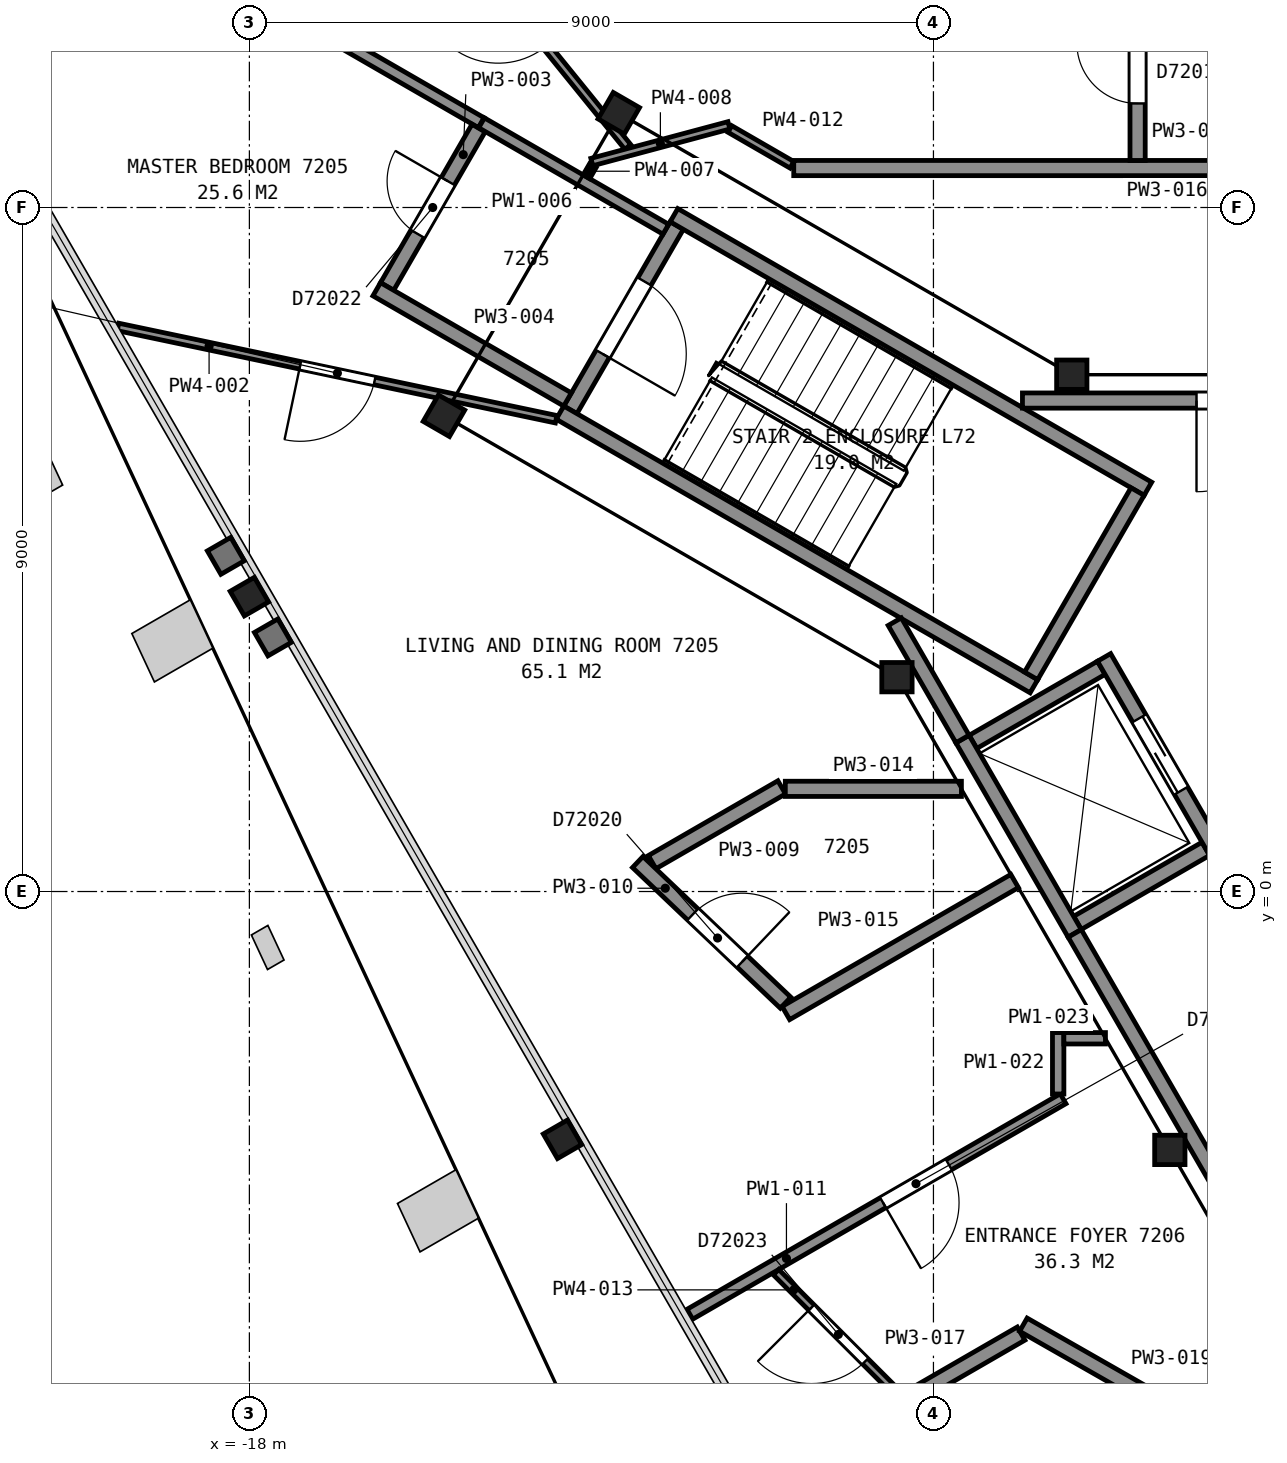
"""IFC4 building model, lengths in metres.
Left out: names, types, materials, properties, quantities, classifications, styles, units other than length and angle.
Written with IfcOpenShell. Run it as: python <this file> out.ifc"""

import sys

from ifc_helpers import new_model, si_unit, direction, frame, frame_2d, origin, origin_2d, place, context, subcontext, project, spatial, rectangle, i_section, extrude, element, fill, save


model = new_model("IFC4")
c1 = context("Model", 3, precision=1e-05, world=origin(), true_north=direction((0.0, 1.0)))
c2 = subcontext(c1, "Body", "Model", "MODEL_VIEW")
j1 = project(units=[si_unit("LENGTHUNIT", "METRE"), si_unit("PLANEANGLEUNIT", "RADIAN")], contexts=[c1])
p1 = place(None, origin())
s1 = spatial("IfcSite", under=j1, at=p1, CompositionType="ELEMENT")
p2 = place(p1, origin())
s2 = spatial("IfcBuilding", under=s1, at=p2, CompositionType="ELEMENT")
p3 = place(p2, frame((0.0, 0.0, 286.2)))
s3 = spatial("IfcBuildingStorey", under=s2, at=p3, CompositionType="ELEMENT", Elevation=286.2)
for number, where, z_axis, x_axis in (
    (1, (-18.0, 3.88, 0.0), (0.0, 0.0, 1.0), (-0.5, 0.866, 0.0)),
    (2, (-13.88, -3.26, 0.0), (0.0, 0.0, 1.0), (-0.5, 0.866, 0.0)),
):
    element("IfcColumn", number, at=place(p3, frame(where, z_axis=z_axis, x_axis=x_axis)), inside=s3, PredefinedType="COLUMN", context=c2, shape_type="SweptSolid", body=[
        extrude(i_section(OverallWidth=0.373, OverallDepth=0.368, WebThickness=0.015, FlangeThickness=0.024, FilletRadius=0.015, at=origin_2d()), origin(), (0.0, 0.0, 1.0), 3.7),
    ])
p4 = place(p3, frame((-7.18, 6.8, 0.0), z_axis=(0.0, 0.0, 1.0), x_axis=(1.0, 0.0, 0.0)))
e3 = element("IfcColumn", 3, at=p4, inside=s3, PredefinedType="COLUMN", context=c2, shape_type="SweptSolid", body=[
    extrude(i_section(OverallWidth=0.399, OverallDepth=0.386, WebThickness=0.021, FlangeThickness=0.033, FilletRadius=0.015, at=origin_2d()), origin(), (0.0, 0.0, 1.0), 3.7),
])
for number, where, z_axis, x_axis in (
    (4, (-13.14, 10.24, 0.0), (0.0, 0.0, 1.0), (0.5, 0.866, 0.0)),
    (5, (-15.44, 6.26, 0.0), (0.0, 0.0, 1.0), (0.5, 0.866, 0.0)),
):
    element("IfcColumn", number, at=place(p3, frame(where, z_axis=z_axis, x_axis=x_axis)), inside=s3, PredefinedType="COLUMN", context=c2, shape_type="SweptSolid", body=[
        extrude(i_section(OverallWidth=0.401, OverallDepth=0.399, WebThickness=0.025, FlangeThickness=0.04, FilletRadius=0.015, at=origin_2d()), origin(), (0.0, 0.0, 1.0), 3.7),
    ])
for number, where, z_axis, x_axis in (
    (6, (-9.48, 2.82, 0.0), (0.0, 0.0, 1.0), (1.0, 0.0, 0.0)),
    (7, (-5.89, -3.4, 0.0), (0.0, 0.0, 1.0), (1.0, 0.0, 0.0)),
):
    element("IfcColumn", number, at=place(p3, frame(where, z_axis=z_axis, x_axis=x_axis)), inside=s3, PredefinedType="COLUMN", context=c2, shape_type="SweptSolid", body=[
        extrude(i_section(OverallWidth=0.399, OverallDepth=0.386, WebThickness=0.021, FlangeThickness=0.033, FilletRadius=0.015, at=origin_2d()), origin(), (0.0, 0.0, 1.0), 3.7),
    ])
p5 = place(p3, frame((-12.377, 8.762, 0.0), z_axis=(0.0, 0.0, 1.0), x_axis=(-0.500049511043, -0.865996816683, 0.0)))
e8 = element("IfcWall", 8, at=p5, inside=s3, PredefinedType="PARTITIONING", context=c2, shape_type="SweptSolid", body=[
    extrude(rectangle(XDim=2.8, YDim=0.2, at=frame_2d((1.4, 0.0))), origin(), (0.0, 0.0, 1.0), 3.45),
])
p6 = place(p5, frame((0.85, 0.0, 0.0)))
e9 = element("IfcOpeningElement", 9, at=p6, cuts=e8, PredefinedType="OPENING", context=c2, shape_type="SweptSolid", body=[
    extrude(rectangle(XDim=1.1, YDim=2.1, at=frame_2d((0.55, 1.05))), frame((0.0, 0.11, 0.0), z_axis=(0.0, -1.0, 0.0), x_axis=(1.0, 0.0, 0.0)), (0.0, 0.0, 1.0), 0.22),
])
for number, where, z_axis, x_axis in (
    (10, (-7.678, 2.701, 0.0), (0.0, 0.0, 1.0), (-0.866, 0.5, 0.0)),
    (11, (-6.178, 5.299, 0.0), (0.0, 0.0, 1.0), (-0.866, 0.5, 0.0)),
):
    element("IfcWall", number, at=place(p3, frame(where, z_axis=z_axis, x_axis=x_axis)), inside=s3, PredefinedType="PARTITIONING", context=c2, shape_type="SweptSolid", body=[
        extrude(rectangle(XDim=7.2, YDim=0.2, at=frame_2d((3.6, 0.0))), origin(), (0.0, 0.0, 1.0), 3.45),
    ])
p7 = place(p3, frame((-6.315, 5.262, 0.0), z_axis=(0.0, 0.0, 1.0), x_axis=(-0.500049511043, -0.865996816683, 0.0)))
e12 = element("IfcWall", 12, at=p7, inside=s3, PredefinedType="PARTITIONING", context=c2, shape_type="SweptSolid", body=[
    extrude(rectangle(XDim=2.8, YDim=0.2, at=frame_2d((1.4, 0.0))), origin(), (0.0, 0.0, 1.0), 3.45),
])
for number, where, z_axis, x_axis in (
    (13, (-7.105, -0.413, 0.0), (0.0, 0.0, 1.0), (0.866, 0.5, 0.0)),
    (14, (-8.48, 1.969, 0.0), (0.0, 0.0, 1.0), (0.866, 0.5, 0.0)),
):
    element("IfcWall", number, at=place(p3, frame(where, z_axis=z_axis, x_axis=x_axis)), inside=s3, PredefinedType="PARTITIONING", context=c2, shape_type="SweptSolid", body=[
        extrude(rectangle(XDim=1.95, YDim=0.2, at=frame_2d((0.975, 0.0))), origin(), (0.0, 0.0, 1.0), 3.7),
    ])
p8 = place(p3, frame((-5.28, 0.525, 0.0), z_axis=(0.0, 0.0, 1.0), x_axis=(-0.500037662692, 0.866003658127, 0.0)))
e15 = element("IfcWall", 15, at=p8, inside=s3, PredefinedType="PARTITIONING", context=c2, shape_type="SweptSolid", body=[
    extrude(rectangle(XDim=2.95, YDim=0.2, at=frame_2d((1.475, 0.0))), origin(), (0.0, 0.0, 1.0), 3.7),
])
p9 = place(p8, frame((0.925, 0.0, 0.0)))
e16 = element("IfcOpeningElement", 16, at=p9, cuts=e15, PredefinedType="OPENING", context=c2, shape_type="SweptSolid", body=[
    extrude(rectangle(XDim=1.1, YDim=2.1, at=frame_2d((0.55, 1.05))), frame((0.0, 0.11, 0.0), z_axis=(0.0, -1.0, 0.0), x_axis=(1.0, 0.0, 0.0)), (0.0, 0.0, 1.0), 0.22),
])
p10 = place(p3, frame((-7.142, -0.55, 0.0), z_axis=(0.0, 0.0, 1.0), x_axis=(-0.49997559174, 0.866039495442, 0.0)))
e17 = element("IfcWall", 17, at=p10, inside=s3, PredefinedType="PARTITIONING", context=c2, shape_type="SweptSolid", body=[
    extrude(rectangle(XDim=2.95, YDim=0.2, at=frame_2d((1.475, 0.0))), origin(), (0.0, 0.0, 1.0), 3.7),
])
p11 = place(p3, frame((-9.509, 3.551, 0.0), z_axis=(0.0, 0.0, 1.0), x_axis=(0.499999136801, -0.866025902152, 0.0)))
e18 = element("IfcWall", 18, at=p11, inside=s3, PredefinedType="PARTITIONING", context=c2, shape_type="SweptSolid", body=[
    extrude(rectangle(XDim=1.782, YDim=0.2, at=frame_2d((0.891, 0.0))), origin(), (0.0, 0.0, 1.0), 3.45),
])
p12 = place(p3, frame((7.829, 6.46, 0.0), z_axis=(0.0, 0.0, 1.0), x_axis=(-1.0, 0.0, 0.0)))
e19 = element("IfcWall", 19, at=p12, inside=s3, PredefinedType="PARTITIONING", context=c2, shape_type="SweptSolid", body=[
    extrude(rectangle(XDim=15.658, YDim=0.2, at=frame_2d((7.829, 0.0))), origin(), (0.0, 0.0, 1.0), 3.45),
])
p13 = place(p12, frame((12.168, 0.0, 0.0)))
e20 = element("IfcOpeningElement", 20, at=p13, cuts=e19, PredefinedType="OPENING", context=c2, shape_type="SweptSolid", body=[
    extrude(rectangle(XDim=1.2, YDim=2.1, at=frame_2d((0.6, 1.05))), frame((0.0, 0.11, 0.0), z_axis=(0.0, -1.0, 0.0), x_axis=(1.0, 0.0, 0.0)), (0.0, 0.0, 1.0), 0.22),
])
p14 = place(p3, frame((-7.141, -0.551, 0.0), z_axis=(0.0, 0.0, 1.0), x_axis=(0.500001302854, -0.86602465158, 0.0)))
e21 = element("IfcWall", 21, at=p14, inside=s3, PredefinedType="PARTITIONING", context=c2, shape_type="SweptSolid", body=[
    extrude(rectangle(XDim=6.846, YDim=0.2, at=frame_2d((3.423, 0.0))), origin(), (0.0, 0.0, 1.0), 3.45),
])
p15 = place(p14, frame((5.0, 0.0, 0.0)))
e22 = element("IfcOpeningElement", 22, at=p15, cuts=e21, PredefinedType="OPENING", context=c2, shape_type="SweptSolid", body=[
    extrude(rectangle(XDim=1.2, YDim=2.1, at=frame_2d((0.6, 1.05))), frame((0.0, 0.11, 0.0), z_axis=(0.0, -1.0, 0.0), x_axis=(1.0, 0.0, 0.0)), (0.0, 0.0, 1.0), 0.22),
])
p16 = place(p3, frame((-20.506, 13.324, 0.0), z_axis=(0.0, 0.0, 1.0), x_axis=(0.866004971522, -0.500035388047, 0.0)))
e23 = element("IfcWall", 23, at=p16, inside=s3, PredefinedType="PARTITIONING", context=c2, shape_type="SweptSolid", body=[
    extrude(rectangle(XDim=6.416, YDim=0.15, at=frame_2d((3.208, 0.0))), origin(), (0.0, 0.0, 1.0), 2.723),
])
p17 = place(p3, frame((-19.729, 7.428, 0.0), z_axis=(0.0, 0.0, 1.0), x_axis=(0.97852427483, -0.206131617102, 0.0)))
e24 = element("IfcWall", 24, at=p17, inside=s3, PredefinedType="PARTITIONING", context=c2, shape_type="SweptSolid", body=[
    extrude(rectangle(XDim=5.891, YDim=0.1, at=frame_2d((2.946, 0.0))), origin(), (0.0, 0.0, 1.0), 2.723),
])
p18 = place(p17, frame((2.45, 0.0, 0.0)))
e25 = element("IfcOpeningElement", 25, at=p18, cuts=e24, PredefinedType="OPENING", context=c2, shape_type="SweptSolid", body=[
    extrude(rectangle(XDim=1.0, YDim=2.1, at=frame_2d((0.5, 1.05))), frame((0.0, 0.06, 0.0), z_axis=(0.0, -1.0, 0.0), x_axis=(1.0, 0.0, 0.0)), (0.0, 0.0, 1.0), 0.12),
])
p19 = place(p3, frame((-14.985, 10.045, 0.0), z_axis=(0.0, 0.0, 1.0), x_axis=(-0.499903970786, -0.866080839178, 0.0)))
e26 = element("IfcWall", 26, at=p19, inside=s3, PredefinedType="PARTITIONING", context=c2, shape_type="SweptSolid", body=[
    extrude(rectangle(XDim=2.406, YDim=0.2, at=frame_2d((1.203, 0.0))), origin(), (0.0, 0.0, 1.0), 2.723),
])
p20 = place(p19, frame((0.806, 0.0, 0.0)))
e27 = element("IfcOpeningElement", 27, at=p20, cuts=e26, PredefinedType="OPENING", context=c2, shape_type="SweptSolid", body=[
    extrude(rectangle(XDim=0.8, YDim=2.1, at=frame_2d((0.4, 1.05))), frame((0.0, 0.11, 0.0), z_axis=(0.0, -1.0, 0.0), x_axis=(1.0, 0.0, 0.0)), (0.0, 0.0, 1.0), 0.22),
])
p21 = place(p3, frame((-16.325, 7.924, 0.0), z_axis=(0.0, 0.0, 1.0), x_axis=(0.865969617579, -0.500096612097, 0.0)))
e28 = element("IfcWall", 28, at=p21, inside=s3, PredefinedType="PARTITIONING", context=c2, shape_type="SweptSolid", body=[
    extrude(rectangle(XDim=2.899, YDim=0.2, at=frame_2d((1.45, 0.0))), origin(), (0.0, 0.0, 1.0), 2.723),
])
p22 = place(p3, frame((-13.021, 9.797, 0.0), z_axis=(0.0, 0.0, 1.0), x_axis=(-0.629738754572, 0.776806990822, 0.0)))
e29 = element("IfcWall", 29, at=p22, inside=s3, PredefinedType="PARTITIONING", context=c2, shape_type="SweptSolid", body=[
    extrude(rectangle(XDim=4.598, YDim=0.1, at=frame_2d((2.299, 0.0))), origin(), (0.0, 0.0, 1.0), 2.723),
])
p23 = place(p22, frame((1.706, 0.0, 0.0)))
e30 = element("IfcOpeningElement", 30, at=p23, cuts=e29, PredefinedType="OPENING", context=c2, shape_type="SweptSolid", body=[
    extrude(rectangle(XDim=1.0, YDim=2.1, at=frame_2d((0.5, 1.05))), frame((0.0, 0.06, 0.0), z_axis=(0.0, -1.0, 0.0), x_axis=(1.0, 0.0, 0.0)), (0.0, 0.0, 1.0), 0.12),
])
p24 = place(p3, frame((-14.945, 10.114, 0.0), z_axis=(0.0, 0.0, 1.0), x_axis=(0.865969158485, -0.500097407065, 0.0)))
e31 = element("IfcWall", 31, at=p24, inside=s3, PredefinedType="PARTITIONING", context=c2, shape_type="SweptSolid", body=[
    extrude(rectangle(XDim=2.799, YDim=0.15, at=frame_2d((1.4, 0.0))), origin(), (0.0, 0.0, 1.0), 2.723),
])
p25 = place(p3, frame((-13.565, 9.404, 0.0), z_axis=(0.0, 0.0, 1.0), x_axis=(0.500181256421, 0.865920730047, 0.0)))
e32 = element("IfcWall", 32, at=p25, inside=s3, PredefinedType="PARTITIONING", context=c2, shape_type="SweptSolid", body=[
    extrude(rectangle(XDim=0.169, YDim=0.1, at=frame_2d((0.084, 0.0))), origin(), (0.0, 0.0, 1.0), 2.723),
])
p26 = place(p3, frame((-13.494, 9.598, 0.0), z_axis=(0.0, 0.0, 1.0), x_axis=(0.96601104623, 0.258500790254, 0.0)))
e33 = element("IfcWall", 33, at=p26, inside=s3, PredefinedType="PARTITIONING", context=c2, shape_type="SweptSolid", body=[
    extrude(rectangle(XDim=1.867, YDim=0.1, at=frame_2d((0.934, 0.0))), origin(), (0.0, 0.0, 1.0), 2.723),
])
p27 = place(p3, frame((-12.701, 0.386, 0.0), z_axis=(0.0, 0.0, 1.0), x_axis=(0.866028603765, 0.49999445743, 0.0)))
e34 = element("IfcWall", 34, at=p27, inside=s3, PredefinedType="PARTITIONING", context=c2, shape_type="SweptSolid", body=[
    extrude(rectangle(XDim=1.968, YDim=0.2, at=frame_2d((0.984, 0.0))), origin(), (0.0, 0.0, 1.0), 2.723),
])
p28 = place(p3, frame((-12.89, 0.388, 0.0), z_axis=(0.0, 0.0, 1.0), x_axis=(0.724395225918, -0.689384911836, 0.0)))
e35 = element("IfcWall", 35, at=p28, inside=s3, PredefinedType="PARTITIONING", context=c2, shape_type="SweptSolid", body=[
    extrude(rectangle(XDim=2.685, YDim=0.2, at=frame_2d((1.342, 0.0))), origin(), (0.0, 0.0, 1.0), 2.723),
])
p29 = place(p28, frame((1.0, 0.0, 0.0)))
e36 = element("IfcOpeningElement", 36, at=p29, cuts=e35, PredefinedType="OPENING", context=c2, shape_type="SweptSolid", body=[
    extrude(rectangle(XDim=0.9, YDim=2.1, at=frame_2d((0.45, 1.05))), frame((0.0, 0.11, 0.0), z_axis=(0.0, -1.0, 0.0), x_axis=(1.0, 0.0, 0.0)), (0.0, 0.0, 1.0), 0.22),
])
p30 = place(p3, frame((-12.205, -5.562, 0.0), z_axis=(0.0, 0.0, 1.0), x_axis=(0.866006351856, 0.500032997455, 0.0)))
e37 = element("IfcWall", 37, at=p30, inside=s3, PredefinedType="PARTITIONING", context=c2, shape_type="SweptSolid", body=[
    extrude(rectangle(XDim=5.671, YDim=0.15, at=frame_2d((2.835, 0.0))), origin(), (0.0, 0.0, 1.0), 2.723),
])
p31 = place(p30, frame((2.935, 0.0, 0.0)))
e38 = element("IfcOpeningElement", 38, at=p31, cuts=e37, PredefinedType="OPENING", context=c2, shape_type="SweptSolid", body=[
    extrude(rectangle(XDim=1.0, YDim=2.1, at=frame_2d((0.5, 1.05))), frame((0.0, 0.085, 0.0), z_axis=(0.0, -1.0, 0.0), x_axis=(1.0, 0.0, 0.0)), (0.0, 0.0, 1.0), 0.17),
])
p32 = place(p3, frame((-11.678, 10.033, 0.0), z_axis=(0.0, 0.0, 1.0), x_axis=(0.866116627388, -0.499841962787, 0.0)))
e39 = element("IfcWall", 39, at=p32, inside=s3, PredefinedType="PARTITIONING", context=c2, shape_type="SweptSolid", body=[
    extrude(rectangle(XDim=0.943, YDim=0.1, at=frame_2d((0.472, 0.0))), origin(), (0.0, 0.0, 1.0), 2.723),
])
p33 = place(p3, frame((-9.452, -6.627, 0.0), z_axis=(0.0, 0.0, 1.0), x_axis=(-0.707106781187, 0.707106781187, 0.0)))
e40 = element("IfcWall", 40, at=p33, inside=s3, PredefinedType="PARTITIONING", context=c2, shape_type="SweptSolid", body=[
    extrude(rectangle(XDim=2.289, YDim=0.1, at=frame_2d((1.145, 0.0))), origin(), (0.0, 0.0, 1.0), 2.723),
])
p34 = place(p33, frame((0.63, 0.0, 0.0)))
e41 = element("IfcOpeningElement", 41, at=p34, cuts=e40, PredefinedType="OPENING", context=c2, shape_type="SweptSolid", body=[
    extrude(rectangle(XDim=1.0, YDim=2.1, at=frame_2d((0.5, 1.05))), frame((0.0, 0.06, 0.0), z_axis=(0.0, -1.0, 0.0), x_axis=(1.0, 0.0, 0.0)), (0.0, 0.0, 1.0), 0.12),
])
p35 = place(p3, frame((-10.949, 1.351, 0.0), z_axis=(0.0, 0.0, 1.0), x_axis=(1.0, 0.0, 0.0)))
e42 = element("IfcWall", 42, at=p35, inside=s3, PredefinedType="PARTITIONING", context=c2, shape_type="SweptSolid", body=[
    extrude(rectangle(XDim=2.317, YDim=0.2, at=frame_2d((1.158, 0.0))), origin(), (0.0, 0.0, 1.0), 2.723),
])
p36 = place(p3, frame((-10.942, -1.599, 0.0), z_axis=(0.0, 0.0, 1.0), x_axis=(0.866134116492, 0.499811656775, 0.0)))
e43 = element("IfcWall", 43, at=p36, inside=s3, PredefinedType="PARTITIONING", context=c2, shape_type="SweptSolid", body=[
    extrude(rectangle(XDim=3.475, YDim=0.2, at=frame_2d((1.737, 0.0))), origin(), (0.0, 0.0, 1.0), 2.723),
])
p37 = place(p3, frame((-10.838, 9.519, 0.0), z_axis=(0.0, 0.0, 1.0), x_axis=(1.0, 0.0, 0.0)))
e44 = element("IfcWall", 44, at=p37, inside=s3, PredefinedType="PARTITIONING", context=c2, shape_type="SweptSolid", body=[
    extrude(rectangle(XDim=9.824, YDim=0.2, at=frame_2d((4.912, 0.0))), origin(), (0.0, 0.0, 1.0), 2.723),
])
p38 = place(p3, frame((-9.27, -6.638, 0.0), z_axis=(0.0, 0.0, 1.0), x_axis=(0.865883664904, 0.500245418622, 0.0)))
e45 = element("IfcWall", 45, at=p38, inside=s3, PredefinedType="PARTITIONING", context=c2, shape_type="SweptSolid", body=[
    extrude(rectangle(XDim=1.643, YDim=0.2, at=frame_2d((0.822, 0.0))), origin(), (0.0, 0.0, 1.0), 2.723),
])
p39 = place(p3, frame((-7.817, -5.699, 0.0), z_axis=(0.0, 0.0, 1.0), x_axis=(0.868528315933, -0.495639550906, 0.0)))
e46 = element("IfcWall", 46, at=p39, inside=s3, PredefinedType="PARTITIONING", context=c2, shape_type="SweptSolid", body=[
    extrude(rectangle(XDim=3.212, YDim=0.2, at=frame_2d((1.606, 0.0))), origin(), (0.0, 0.0, 1.0), 2.723),
])
p40 = place(p3, frame((-7.359, -2.664, 0.0), z_axis=(0.0, 0.0, 1.0), x_axis=(0.0, 1.0, 0.0)))
e47 = element("IfcWall", 47, at=p40, inside=s3, PredefinedType="PARTITIONING", context=c2, shape_type="SweptSolid", body=[
    extrude(rectangle(XDim=0.808, YDim=0.15, at=frame_2d((0.404, 0.0))), origin(), (0.0, 0.0, 1.0), 2.723),
])
p41 = place(p3, frame((-7.284, -1.931, 0.0), z_axis=(0.0, 0.0, 1.0), x_axis=(1.0, 0.0, 0.0)))
e48 = element("IfcWall", 48, at=p41, inside=s3, PredefinedType="PARTITIONING", context=c2, shape_type="SweptSolid", body=[
    extrude(rectangle(XDim=0.547, YDim=0.15, at=frame_2d((0.273, 0.0))), origin(), (0.0, 0.0, 1.0), 2.723),
])
p42 = place(p3, frame((-6.314, 11.919, 0.0), z_axis=(0.0, 0.0, 1.0), x_axis=(0.0, -1.0, 0.0)))
e49 = element("IfcWall", 49, at=p42, inside=s3, PredefinedType="PARTITIONING", context=c2, shape_type="SweptSolid", body=[
    extrude(rectangle(XDim=2.3, YDim=0.2, at=frame_2d((1.15, 0.0))), origin(), (0.0, 0.0, 1.0), 2.723),
])
p43 = place(p42, frame((0.75, 0.0, 0.0)))
e50 = element("IfcOpeningElement", 50, at=p43, cuts=e49, PredefinedType="OPENING", context=c2, shape_type="SweptSolid", body=[
    extrude(rectangle(XDim=0.8, YDim=2.1, at=frame_2d((0.4, 1.05))), frame((0.0, 0.11, 0.0), z_axis=(0.0, -1.0, 0.0), x_axis=(1.0, 0.0, 0.0)), (0.0, 0.0, 1.0), 0.22),
])
p44 = place(p6, origin())
e51 = element("IfcDoor", 51, at=p44, inside=s3, OperationType="SINGLE_SWING_RIGHT", PredefinedType="DOOR", context=c2, shape_type="SweptSolid", body=[
    extrude(rectangle(XDim=1.1, YDim=2.1, at=frame_2d((0.55, 1.05))), frame((0.0, 0.025, 0.0), z_axis=(0.0, -1.0, 0.0), x_axis=(1.0, 0.0, 0.0)), (0.0, 0.0, 1.0), 0.05),
])
fill(e9, e51)
p45 = place(p9, origin())
e52 = element("IfcDoor", 52, at=p45, inside=s3, OperationType="SLIDING_TO_LEFT", PredefinedType="DOOR", context=c2, shape_type="SweptSolid", body=[
    extrude(rectangle(XDim=1.1, YDim=2.1, at=frame_2d((0.55, 1.05))), frame((0.0, 0.025, 0.0), z_axis=(0.0, -1.0, 0.0), x_axis=(1.0, 0.0, 0.0)), (0.0, 0.0, 1.0), 0.05),
])
fill(e16, e52)
p46 = place(p13, origin())
e53 = element("IfcDoor", 53, at=p46, inside=s3, OperationType="SINGLE_SWING_RIGHT", PredefinedType="DOOR", context=c2, shape_type="SweptSolid", body=[
    extrude(rectangle(XDim=1.2, YDim=2.1, at=frame_2d((0.6, 1.05))), frame((0.0, 0.025, 0.0), z_axis=(0.0, -1.0, 0.0), x_axis=(1.0, 0.0, 0.0)), (0.0, 0.0, 1.0), 0.05),
])
fill(e20, e53)
p47 = place(p18, origin())
e54 = element("IfcDoor", 54, at=p47, inside=s3, OperationType="SINGLE_SWING_LEFT", PredefinedType="DOOR", context=c2, shape_type="SweptSolid", body=[
    extrude(rectangle(XDim=1.0, YDim=2.1, at=frame_2d((0.5, 1.05))), frame((0.0, 0.025, 0.0), z_axis=(0.0, -1.0, 0.0), x_axis=(1.0, 0.0, 0.0)), (0.0, 0.0, 1.0), 0.05),
])
fill(e25, e54)
p48 = place(p20, origin())
e55 = element("IfcDoor", 55, at=p48, inside=s3, OperationType="SINGLE_SWING_LEFT", PredefinedType="DOOR", context=c2, shape_type="SweptSolid", body=[
    extrude(rectangle(XDim=0.8, YDim=2.1, at=frame_2d((0.4, 1.05))), frame((0.0, 0.025, 0.0), z_axis=(0.0, -1.0, 0.0), x_axis=(1.0, 0.0, 0.0)), (0.0, 0.0, 1.0), 0.05),
])
fill(e27, e55)
p49 = place(p29, origin())
e56 = element("IfcDoor", 56, at=p49, inside=s3, OperationType="SINGLE_SWING_RIGHT", PredefinedType="DOOR", context=c2, shape_type="SweptSolid", body=[
    extrude(rectangle(XDim=0.9, YDim=2.1, at=frame_2d((0.45, 1.05))), frame((0.0, 0.025, 0.0), z_axis=(0.0, -1.0, 0.0), x_axis=(1.0, 0.0, 0.0)), (0.0, 0.0, 1.0), 0.05),
])
fill(e36, e56)
p50 = place(p31, origin())
e57 = element("IfcDoor", 57, at=p50, inside=s3, OperationType="SINGLE_SWING_LEFT", PredefinedType="DOOR", context=c2, shape_type="SweptSolid", body=[
    extrude(rectangle(XDim=1.0, YDim=2.1, at=frame_2d((0.5, 1.05))), frame((0.0, 0.025, 0.0), z_axis=(0.0, -1.0, 0.0), x_axis=(1.0, 0.0, 0.0)), (0.0, 0.0, 1.0), 0.05),
])
fill(e38, e57)
p51 = place(p34, origin())
e58 = element("IfcDoor", 58, at=p51, inside=s3, OperationType="SINGLE_SWING_RIGHT", PredefinedType="DOOR", context=c2, shape_type="SweptSolid", body=[
    extrude(rectangle(XDim=1.0, YDim=2.1, at=frame_2d((0.5, 1.05))), frame((0.0, 0.025, 0.0), z_axis=(0.0, -1.0, 0.0), x_axis=(1.0, 0.0, 0.0)), (0.0, 0.0, 1.0), 0.05),
])
fill(e41, e58)
p52 = place(p43, origin())
e59 = element("IfcDoor", 59, at=p52, inside=s3, OperationType="SINGLE_SWING_LEFT", PredefinedType="DOOR", context=c2, shape_type="SweptSolid", body=[
    extrude(rectangle(XDim=0.8, YDim=2.1, at=frame_2d((0.4, 1.05))), frame((0.0, 0.025, 0.0), z_axis=(0.0, -1.0, 0.0), x_axis=(1.0, 0.0, 0.0)), (0.0, 0.0, 1.0), 0.05),
])
fill(e50, e59)
save(model, sys.argv[1])
